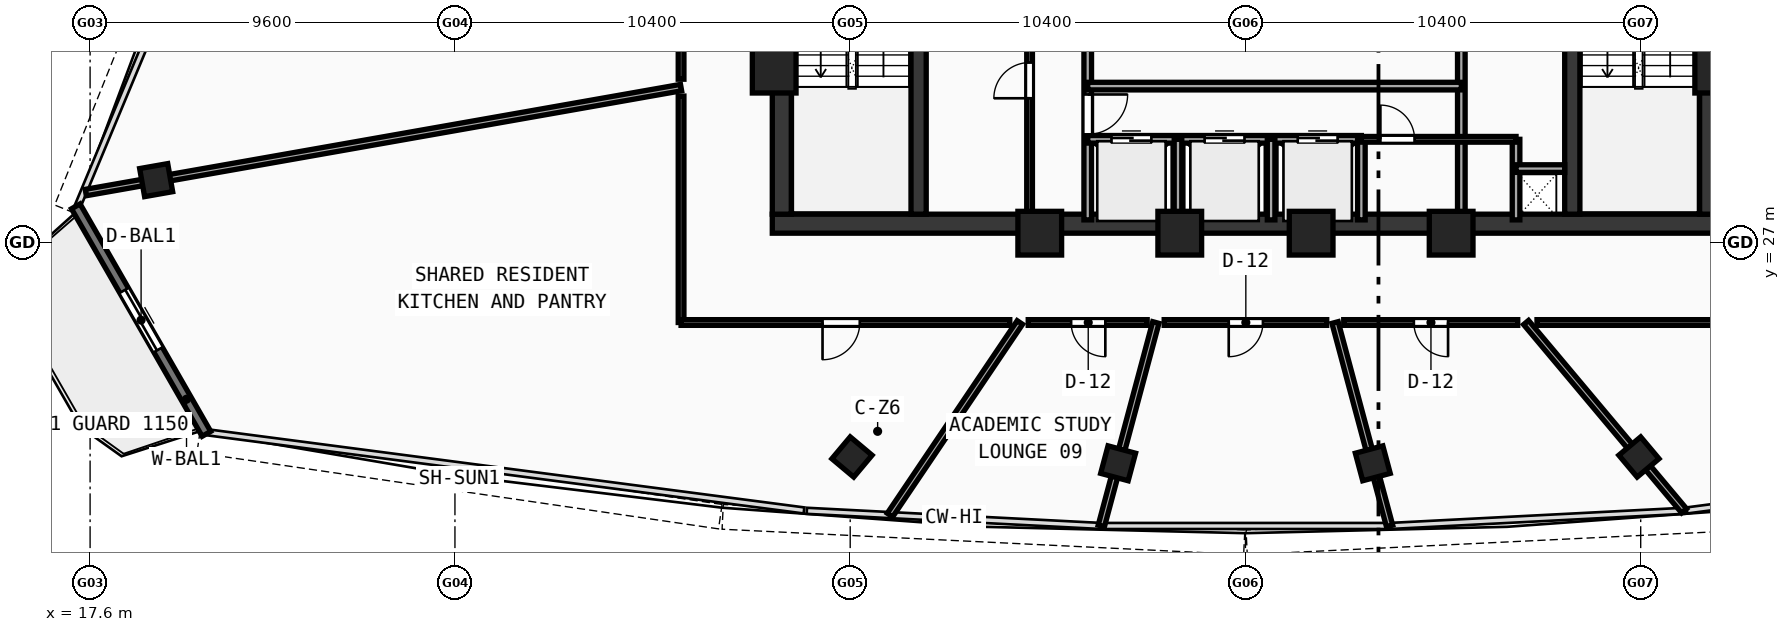
"""IFC4 building model, lengths in metres.
Left out: names, types, materials, properties, quantities, classifications, styles, units other than length and angle.
Written with IfcOpenShell. Run it as: python <this file> out.ifc"""

import sys

from ifc_helpers import new_model, si_unit, direction, frame, frame_2d, origin, origin_with_axes, origin_2d, place, context, subcontext, project, spatial, rectangle, hollow_rectangle, extrude, source, transform, mapped, element, fill, save


model = new_model("IFC4")
c1 = context("Model", 3, precision=1e-05, world=origin(), true_north=direction((0.0, 1.0)))
c2 = subcontext(c1, "Body", "Model", "MODEL_VIEW")
j1 = project(units=[si_unit("LENGTHUNIT", "METRE"), si_unit("PLANEANGLEUNIT", "RADIAN")], contexts=[c1])
p1 = place(None, origin())
s1 = spatial("IfcSite", under=j1, at=p1, CompositionType="ELEMENT")
p2 = place(p1, origin())
s2 = spatial("IfcBuilding", under=s1, at=p2, CompositionType="ELEMENT")
p3 = place(p2, frame((0.0, 0.0, 307.4)))
s3 = spatial("IfcBuildingStorey", under=s2, at=p3, CompositionType="ELEMENT", Elevation=307.4)
p4 = place(p3, frame((35.55, 27.5, 0.0), z_axis=(0.0, 0.0, 1.0), x_axis=(1.0, 0.0, 0.0)))
e1 = element("IfcWall", 1, at=p4, inside=s3, PredefinedType="SHEAR", context=c2, shape_type="SweptSolid", body=[
    extrude(rectangle(XDim=24.9, YDim=0.5, at=frame_2d((12.45, 0.0))), origin(), (0.0, 0.0, 1.0), 3.47),
])
for number, where, z_axis, x_axis in (
    (2, (35.8, 27.75, 0.0), (0.0, 0.0, 1.0), (0.0, 1.0, 0.0)),
    (3, (60.2, 27.75, 0.0), (0.0, 0.0, 1.0), (0.0, 1.0, 0.0)),
):
    element("IfcWall", number, at=place(p3, frame(where, z_axis=z_axis, x_axis=x_axis)), inside=s3, PredefinedType="SHEAR", context=c2, shape_type="SweptSolid", body=[
        extrude(rectangle(XDim=12.2, YDim=0.5, at=frame_2d((6.1, 0.0))), origin(), (0.0, 0.0, 1.0), 3.47),
    ])
p5 = place(p3, frame((39.4, 27.75, 0.0), z_axis=(0.0, 0.0, 1.0), x_axis=(0.0, 1.0, 0.0)))
e4 = element("IfcWall", 4, at=p5, inside=s3, PredefinedType="SHEAR", context=c2, shape_type="SweptSolid", body=[
    extrude(rectangle(XDim=12.2, YDim=0.4, at=frame_2d((6.1, 0.0))), origin(), (0.0, 0.0, 1.0), 3.47),
])
p6 = place(p5, frame((10.0, 0.0, 0.0)))
e5 = element("IfcOpeningElement", 5, at=p6, cuts=e4, PredefinedType="OPENING", context=c2, shape_type="SweptSolid", body=[
    extrude(rectangle(XDim=1.1, YDim=2.1, at=frame_2d((0.55, 1.05))), frame((0.0, 0.21, 0.0), z_axis=(0.0, -1.0, 0.0), x_axis=(1.0, 0.0, 0.0)), (0.0, 0.0, 1.0), 0.42),
])
p7 = place(p3, frame((56.6, 27.75, 0.0), z_axis=(0.0, 0.0, 1.0), x_axis=(0.0, 1.0, 0.0)))
e6 = element("IfcWall", 6, at=p7, inside=s3, PredefinedType="SHEAR", context=c2, shape_type="SweptSolid", body=[
    extrude(rectangle(XDim=12.2, YDim=0.4, at=frame_2d((6.1, 0.0))), origin(), (0.0, 0.0, 1.0), 3.47),
])
p8 = place(p7, frame((10.0, 0.0, 0.0)))
e7 = element("IfcOpeningElement", 7, at=p8, cuts=e6, PredefinedType="OPENING", context=c2, shape_type="SweptSolid", body=[
    extrude(rectangle(XDim=1.1, YDim=2.1, at=frame_2d((0.55, 1.05))), frame((0.0, 0.21, 0.0), z_axis=(0.0, -1.0, 0.0), x_axis=(1.0, 0.0, 0.0)), (0.0, 0.0, 1.0), 0.42),
])
m1 = source(origin(), c2, "Body", "SweptSolid", [
    extrude(hollow_rectangle(XDim=1.15, YDim=1.15, WallThickness=0.048, at=origin_2d()), origin(), (0.0, 0.0, 1.0), 3.73),
])
for number, where, z_axis, x_axis in (
    (8, (42.588, 27.25, -0.26), (0.0, 0.0, 1.0), (1.0, 0.0, 0.0)),
    (9, (46.272, 27.25, -0.26), (0.0, 0.0, 1.0), (1.0, 0.0, 0.0)),
    (10, (49.729, 27.25, -0.26), (0.0, 0.0, 1.0), (1.0, 0.0, 0.0)),
    (11, (53.412, 27.25, -0.26), (0.0, 0.0, 1.0), (1.0, 0.0, 0.0)),
    (12, (60.4, 31.513, -0.26), (0.0, 0.0, 1.0), (1.0, 0.0, 0.0)),
    (13, (35.6, 31.513, -0.26), (0.0, 0.0, 1.0), (1.0, 0.0, 0.0)),
):
    element("IfcColumn", number, at=place(p3, frame(where, z_axis=z_axis, x_axis=x_axis)), inside=s3, PredefinedType="COLUMN", context=c2, shape_type="MappedRepresentation", body=[
        mapped(m1, transform((0.0, 0.0, 0.0), scale=1.0)),
    ])
m2 = source(origin(), c2, "Body", "SweptSolid", [
    extrude(hollow_rectangle(XDim=0.75, YDim=0.75, WallThickness=0.028, at=origin_2d()), origin(), (0.0, 0.0, 1.0), 3.73),
])
for number, where, z_axis, x_axis in (
    (14, (37.647, 21.362, -0.26), (0.0, 0.0, 1.0), (0.766, -0.643, 0.0)),
    (15, (44.649, 21.196, -0.26), (0.0, 0.0, 1.0), (0.966, -0.259, 0.0)),
    (16, (51.351, 21.196, -0.26), (0.0, 0.0, 1.0), (0.966, 0.259, 0.0)),
    (17, (58.354, 21.362, -0.26), (0.0, 0.0, 1.0), (0.766, 0.643, 0.0)),
    (18, (19.338, 28.646, -0.26), (0.0, 0.0, 1.0), (0.174, -0.985, 0.0)),
):
    element("IfcColumn", number, at=place(p3, frame(where, z_axis=z_axis, x_axis=x_axis)), inside=s3, PredefinedType="COLUMN", context=c2, shape_type="MappedRepresentation", body=[
        mapped(m2, transform((0.0, 0.0, 0.0), scale=1.0)),
    ])
p9 = place(p3, frame((17.223, 27.957, 0.0), z_axis=(0.0, 0.0, 1.0), x_axis=(0.49793943781, -0.867211805889, 0.0)))
e19 = element("IfcWall", 19, at=p9, inside=s3, PredefinedType="STANDARD", context=c2, shape_type="SweptSolid", body=[
    extrude(rectangle(XDim=6.903, YDim=0.26, at=frame_2d((3.452, 0.0))), origin(), (0.0, 0.0, 1.0), 3.47),
])
p10 = place(p9, frame((2.552, 0.0, 0.0)))
e20 = element("IfcOpeningElement", 20, at=p10, cuts=e19, PredefinedType="OPENING", context=c2, shape_type="SweptSolid", body=[
    extrude(rectangle(XDim=1.8, YDim=2.15, at=frame_2d((0.9, 1.075))), frame((0.0, 0.14, 0.0), z_axis=(0.0, -1.0, 0.0), x_axis=(1.0, 0.0, 0.0)), (0.0, 0.0, 1.0), 0.28),
])
p11 = place(p3, frame((43.85, 27.6, 0.0), z_axis=(0.0, 0.0, 1.0), x_axis=(0.0, 1.0, 0.0)))
e21 = element("IfcWall", 21, at=p11, inside=s3, PredefinedType="SOLIDWALL", context=c2, shape_type="SweptSolid", body=[
    extrude(rectangle(XDim=6.22, YDim=0.2, at=frame_2d((3.11, 0.0))), origin(), (0.0, 0.0, 1.0), 3.47),
])
p12 = place(p11, frame((2.25, 0.0, 0.0)))
e22 = element("IfcOpeningElement", 22, at=p12, cuts=e21, PredefinedType="OPENING", context=c2, shape_type="SweptSolid", body=[
    extrude(rectangle(XDim=1.05, YDim=2.1, at=frame_2d((0.525, 1.05))), frame((0.0, 0.11, 0.0), z_axis=(0.0, -1.0, 0.0), x_axis=(1.0, 0.0, 0.0)), (0.0, 0.0, 1.0), 0.22),
])
p13 = place(p3, frame((53.68, 27.6, 0.0), z_axis=(0.0, 0.0, 1.0), x_axis=(0.0, 1.0, 0.0)))
e23 = element("IfcWall", 23, at=p13, inside=s3, PredefinedType="SOLIDWALL", context=c2, shape_type="SweptSolid", body=[
    extrude(rectangle(XDim=9.05, YDim=0.2, at=frame_2d((4.525, 0.0))), origin(), (0.0, 0.0, 1.0), 3.47),
])
p14 = place(p13, frame((6.9, 0.0, 0.0)))
e24 = element("IfcOpeningElement", 24, at=p14, cuts=e23, PredefinedType="OPENING", context=c2, shape_type="SweptSolid", body=[
    extrude(rectangle(XDim=1.05, YDim=2.1, at=frame_2d((0.525, 1.05))), frame((0.0, 0.11, 0.0), z_axis=(0.0, -1.0, 0.0), x_axis=(1.0, 0.0, 0.0)), (0.0, 0.0, 1.0), 0.22),
])
p15 = place(p3, frame((43.85, 29.72, 0.0), z_axis=(0.0, 0.0, 1.0), x_axis=(1.0, 0.0, 0.0)))
e25 = element("IfcWall", 25, at=p15, inside=s3, PredefinedType="SOLIDWALL", context=c2, shape_type="SweptSolid", body=[
    extrude(rectangle(XDim=7.2, YDim=0.2, at=frame_2d((3.6, 0.0))), origin(), (0.0, 0.0, 1.0), 3.47),
])
p16 = place(p15, frame((0.625, 0.0, 0.0)))
e26 = element("IfcOpeningElement", 26, at=p16, cuts=e25, PredefinedType="OPENING", context=c2, shape_type="SweptSolid", body=[
    extrude(rectangle(XDim=1.05, YDim=2.1, at=frame_2d((0.525, 1.05))), frame((0.0, 0.11, 0.0), z_axis=(0.0, -1.0, 0.0), x_axis=(1.0, 0.0, 0.0)), (0.0, 0.0, 1.0), 0.22),
])
p17 = place(p15, frame((3.075, 0.0, 0.0)))
e27 = element("IfcOpeningElement", 27, at=p17, cuts=e25, PredefinedType="OPENING", context=c2, shape_type="SweptSolid", body=[
    extrude(rectangle(XDim=1.05, YDim=2.1, at=frame_2d((0.525, 1.05))), frame((0.0, 0.11, 0.0), z_axis=(0.0, -1.0, 0.0), x_axis=(1.0, 0.0, 0.0)), (0.0, 0.0, 1.0), 0.22),
])
p18 = place(p15, frame((5.525, 0.0, 0.0)))
e28 = element("IfcOpeningElement", 28, at=p18, cuts=e25, PredefinedType="OPENING", context=c2, shape_type="SweptSolid", body=[
    extrude(rectangle(XDim=1.05, YDim=2.1, at=frame_2d((0.525, 1.05))), frame((0.0, 0.11, 0.0), z_axis=(0.0, -1.0, 0.0), x_axis=(1.0, 0.0, 0.0)), (0.0, 0.0, 1.0), 0.22),
])
p19 = place(p3, frame((51.05, 27.6, 0.0), z_axis=(0.0, 0.0, 1.0), x_axis=(0.0, 1.0, 0.0)))
e29 = element("IfcWall", 29, at=p19, inside=s3, PredefinedType="SOLIDWALL", context=c2, shape_type="SweptSolid", body=[
    extrude(rectangle(XDim=2.12, YDim=0.2, at=frame_2d((1.06, 0.0))), origin(), (0.0, 0.0, 1.0), 3.47),
])
p20 = place(p3, frame((43.85, 31.12, 0.0), z_axis=(0.0, 0.0, 1.0), x_axis=(1.0, 0.0, 0.0)))
e30 = element("IfcWall", 30, at=p20, inside=s3, PredefinedType="SOLIDWALL", context=c2, shape_type="SweptSolid", body=[
    extrude(rectangle(XDim=9.83, YDim=0.2, at=frame_2d((4.915, 0.0))), origin(), (0.0, 0.0, 1.0), 3.47),
])
for number, where, z_axis, x_axis in (
    (31, (46.225, 27.6, 0.0), (0.0, 0.0, 1.0), (0.0, 1.0, 0.0)),
    (32, (48.675, 27.6, 0.0), (0.0, 0.0, 1.0), (0.0, 1.0, 0.0)),
    (33, (55.12, 27.6, 0.0), (0.0, 0.0, 1.0), (0.0, 1.0, 0.0)),
):
    element("IfcWall", number, at=place(p3, frame(where, z_axis=z_axis, x_axis=x_axis)), inside=s3, PredefinedType="SOLIDWALL", context=c2, shape_type="SweptSolid", body=[
        extrude(rectangle(XDim=2.12, YDim=0.2, at=frame_2d((1.06, 0.0))), origin(), (0.0, 0.0, 1.0), 3.47),
    ])
p21 = place(p3, frame((55.12, 28.95, 0.0), z_axis=(0.0, 0.0, 1.0), x_axis=(1.0, 0.0, 0.0)))
e34 = element("IfcWall", 34, at=p21, inside=s3, PredefinedType="SOLIDWALL", context=c2, shape_type="SweptSolid", body=[
    extrude(rectangle(XDim=1.28, YDim=0.2, at=frame_2d((0.64, 0.0))), origin(), (0.0, 0.0, 1.0), 3.47),
])
p22 = place(p3, frame((42.32, 27.6, 0.0), z_axis=(0.0, 0.0, 1.0), x_axis=(0.0, 1.0, 0.0)))
e35 = element("IfcWall", 35, at=p22, inside=s3, PredefinedType="PARTITIONING", context=c2, shape_type="SweptSolid", body=[
    extrude(rectangle(XDim=5.9, YDim=0.15, at=frame_2d((2.95, 0.0))), origin(), (0.0, 0.0, 1.0), 3.47),
])
p23 = place(p22, frame((3.2, 0.0, 0.0)))
e36 = element("IfcOpeningElement", 36, at=p23, cuts=e35, PredefinedType="OPENING", context=c2, shape_type="SweptSolid", body=[
    extrude(rectangle(XDim=0.94, YDim=2.1, at=frame_2d((0.47, 1.05))), frame((0.0, 0.085, 0.0), z_axis=(0.0, -1.0, 0.0), x_axis=(1.0, 0.0, 0.0)), (0.0, 0.0, 1.0), 0.17),
])
p24 = place(p3, frame((51.05, 29.72, 0.0), z_axis=(0.0, 0.0, 1.0), x_axis=(1.0, 0.0, 0.0)))
e37 = element("IfcWall", 37, at=p24, inside=s3, PredefinedType="PARTITIONING", context=c2, shape_type="SweptSolid", body=[
    extrude(rectangle(XDim=4.07, YDim=0.15, at=frame_2d((2.035, 0.0))), origin(), (0.0, 0.0, 1.0), 3.47),
])
p25 = place(p24, frame((0.5, 0.0, 0.0)))
e38 = element("IfcOpeningElement", 38, at=p25, cuts=e37, PredefinedType="OPENING", context=c2, shape_type="SweptSolid", body=[
    extrude(rectangle(XDim=0.9, YDim=2.1, at=frame_2d((0.45, 1.05))), frame((0.0, 0.085, 0.0), z_axis=(0.0, -1.0, 0.0), x_axis=(1.0, 0.0, 0.0)), (0.0, 0.0, 1.0), 0.17),
])
p26 = place(p3, frame((33.15, 31.082, 0.0), z_axis=(0.0, 0.0, 1.0), x_axis=(-0.984807655248, -0.173648732116, 0.0)))
e39 = element("IfcWall", 39, at=p26, inside=s3, PredefinedType="PARTITIONING", context=c2, shape_type="SweptSolid", body=[
    extrude(rectangle(XDim=15.906, YDim=0.17, at=frame_2d((7.953, 0.0))), origin(), (0.0, 0.0, 1.0), 2.87),
])
p27 = place(p3, frame((42.064, 24.9, 0.0), z_axis=(0.0, 0.0, 1.0), x_axis=(-0.559190191843, -0.829039401564, 0.0)))
e40 = element("IfcWall", 40, at=p27, inside=s3, PredefinedType="PARTITIONING", context=c2, shape_type="SweptSolid", body=[
    extrude(rectangle(XDim=6.112, YDim=0.17, at=frame_2d((3.056, 0.0))), origin(), (0.0, 0.0, 1.0), 2.87),
])
for number, where, z_axis, x_axis in (
    (41, (45.642, 24.9, 0.0), (0.0, 0.0, 1.0), (-0.259, -0.966, 0.0)),
    (42, (50.358, 24.9, 0.0), (0.0, 0.0, 1.0), (0.259, -0.966, 0.0)),
):
    element("IfcWall", number, at=place(p3, frame(where, z_axis=z_axis, x_axis=x_axis)), inside=s3, PredefinedType="PARTITIONING", context=c2, shape_type="SweptSolid", body=[
        extrude(rectangle(XDim=5.543, YDim=0.17, at=frame_2d((2.771, 0.0))), origin(), (0.0, 0.0, 1.0), 2.87),
    ])
p28 = place(p3, frame((55.384, 24.9, 0.0), z_axis=(0.0, 0.0, 1.0), x_axis=(0.642794522615, -0.76603864243, 0.0)))
e43 = element("IfcWall", 43, at=p28, inside=s3, PredefinedType="PARTITIONING", context=c2, shape_type="SweptSolid", body=[
    extrude(rectangle(XDim=6.468, YDim=0.17, at=frame_2d((3.234, 0.0))), origin(), (0.0, 0.0, 1.0), 2.87),
])
p29 = place(p3, frame((33.15, 24.9, 0.0), z_axis=(0.0, 0.0, 1.0), x_axis=(0.0, 1.0, 0.0)))
e44 = element("IfcWall", 44, at=p29, inside=s3, PredefinedType="PARTITIONING", context=c2, shape_type="SweptSolid", body=[
    extrude(rectangle(XDim=5.958, YDim=0.15, at=frame_2d((2.979, 0.0))), origin(), (0.0, 0.0, 1.0), 3.12),
])
p30 = place(p3, frame((33.15, 31.301, 0.0), z_axis=(0.0, 0.0, 1.0), x_axis=(0.0, 1.0, 0.0)))
e45 = element("IfcWall", 45, at=p30, inside=s3, PredefinedType="PARTITIONING", context=c2, shape_type="SweptSolid", body=[
    extrude(rectangle(XDim=7.004, YDim=0.15, at=frame_2d((3.502, 0.0))), origin(), (0.0, 0.0, 1.0), 3.47),
])
p31 = place(p30, frame((3.027, 0.0, 0.0)))
e46 = element("IfcOpeningElement", 46, at=p31, cuts=e45, PredefinedType="OPENING", context=c2, shape_type="SweptSolid", body=[
    extrude(rectangle(XDim=0.98, YDim=2.12, at=frame_2d((0.49, 1.06))), frame((0.0, 0.085, 0.0), z_axis=(0.0, -1.0, 0.0), x_axis=(1.0, 0.0, 0.0)), (0.0, 0.0, 1.0), 0.17),
])
p32 = place(p3, frame((62.85, 24.9, 0.0), z_axis=(0.0, 0.0, 1.0), x_axis=(-1.0, 0.0, 0.0)))
e47 = element("IfcWall", 47, at=p32, inside=s3, PredefinedType="PARTITIONING", context=c2, shape_type="SweptSolid", body=[
    extrude(rectangle(XDim=7.179, YDim=0.15, at=frame_2d((3.589, 0.0))), origin(), (0.0, 0.0, 1.0), 3.12),
])
p33 = place(p3, frame((55.164, 24.9, 0.0), z_axis=(0.0, 0.0, 1.0), x_axis=(-1.0, 0.0, 0.0)))
e48 = element("IfcWall", 48, at=p33, inside=s3, PredefinedType="PARTITIONING", context=c2, shape_type="SweptSolid", body=[
    extrude(rectangle(XDim=4.579, YDim=0.15, at=frame_2d((2.289, 0.0))), origin(), (0.0, 0.0, 1.0), 3.47),
])
p34 = place(p33, frame((1.833, 0.0, 0.0)))
e49 = element("IfcOpeningElement", 49, at=p34, cuts=e48, PredefinedType="OPENING", context=c2, shape_type="SweptSolid", body=[
    extrude(rectangle(XDim=0.9, YDim=2.08, at=frame_2d((0.45, 1.04))), frame((0.0, 0.085, 0.0), z_axis=(0.0, -1.0, 0.0), x_axis=(1.0, 0.0, 0.0)), (0.0, 0.0, 1.0), 0.17),
])
p35 = place(p3, frame((50.138, 24.9, 0.0), z_axis=(0.0, 0.0, 1.0), x_axis=(-1.0, 0.0, 0.0)))
e50 = element("IfcWall", 50, at=p35, inside=s3, PredefinedType="PARTITIONING", context=c2, shape_type="SweptSolid", body=[
    extrude(rectangle(XDim=4.276, YDim=0.15, at=frame_2d((2.138, 0.0))), origin(), (0.0, 0.0, 1.0), 3.12),
])
p36 = place(p35, frame((1.678, 0.0, 0.0)))
e51 = element("IfcOpeningElement", 51, at=p36, cuts=e50, PredefinedType="OPENING", context=c2, shape_type="SweptSolid", body=[
    extrude(rectangle(XDim=0.9, YDim=2.08, at=frame_2d((0.45, 1.04))), frame((0.0, 0.085, 0.0), z_axis=(0.0, -1.0, 0.0), x_axis=(1.0, 0.0, 0.0)), (0.0, 0.0, 1.0), 0.17),
])
p37 = place(p3, frame((45.414, 24.9, 0.0), z_axis=(0.0, 0.0, 1.0), x_axis=(-1.0, 0.0, 0.0)))
e52 = element("IfcWall", 52, at=p37, inside=s3, PredefinedType="PARTITIONING", context=c2, shape_type="SweptSolid", body=[
    extrude(rectangle(XDim=3.13, YDim=0.15, at=frame_2d((1.565, 0.0))), origin(), (0.0, 0.0, 1.0), 3.47),
])
p38 = place(p37, frame((1.101, 0.0, 0.0)))
e53 = element("IfcOpeningElement", 53, at=p38, cuts=e52, PredefinedType="OPENING", context=c2, shape_type="SweptSolid", body=[
    extrude(rectangle(XDim=0.9, YDim=2.08, at=frame_2d((0.45, 1.04))), frame((0.0, 0.085, 0.0), z_axis=(0.0, -1.0, 0.0), x_axis=(1.0, 0.0, 0.0)), (0.0, 0.0, 1.0), 0.17),
])
p39 = place(p3, frame((41.799, 24.9, 0.0), z_axis=(0.0, 0.0, 1.0), x_axis=(-1.0, 0.0, 0.0)))
e54 = element("IfcWall", 54, at=p39, inside=s3, PredefinedType="PARTITIONING", context=c2, shape_type="SweptSolid", body=[
    extrude(rectangle(XDim=8.649, YDim=0.15, at=frame_2d((4.324, 0.0))), origin(), (0.0, 0.0, 1.0), 2.87),
])
p40 = place(p39, frame((3.947, 0.0, 0.0)))
e55 = element("IfcOpeningElement", 55, at=p40, cuts=e54, PredefinedType="OPENING", context=c2, shape_type="SweptSolid", body=[
    extrude(rectangle(XDim=0.98, YDim=2.12, at=frame_2d((0.49, 1.06))), frame((0.0, 0.085, 0.0), z_axis=(0.0, -1.0, 0.0), x_axis=(1.0, 0.0, 0.0)), (0.0, 0.0, 1.0), 0.17),
])
m3 = source(origin(), c2, "Body", "SweptSolid", [
    extrude(rectangle(XDim=1.8, YDim=2.15, at=frame_2d((0.9, 1.075))), frame((0.0, 0.025, 0.0), z_axis=(0.0, -1.0, 0.0), x_axis=(1.0, 0.0, 0.0)), (0.0, 0.0, 1.0), 0.05),
])
p41 = place(p10, origin_with_axes())
e56 = element("IfcDoor", 56, at=p41, inside=s3, OperationType="DOUBLE_DOOR_SLIDING", PredefinedType="DOOR", context=c2, shape_type="MappedRepresentation", body=[
    mapped(m3, transform((0.0, 0.0, 0.0), scale=1.0)),
])
fill(e20, e56)
m4 = source(origin(), c2, "Body", "SweptSolid", [
    extrude(rectangle(XDim=1.05, YDim=2.1, at=frame_2d((0.525, 1.05))), frame((0.0, 0.025, 0.0), z_axis=(0.0, -1.0, 0.0), x_axis=(1.0, 0.0, 0.0)), (0.0, 0.0, 1.0), 0.05),
])
p42 = place(p12, frame((1.05, 0.0, 0.0), z_axis=(0.0, 0.0, 1.0), x_axis=(-1.0, 0.0, 0.0)))
e57 = element("IfcDoor", 57, at=p42, inside=s3, OperationType="SINGLE_SWING_LEFT", PredefinedType="DOOR", context=c2, shape_type="MappedRepresentation", body=[
    mapped(m4, transform((0.0, 0.0, 0.0), scale=1.0)),
])
fill(e22, e57)
p43 = place(p16, origin_with_axes())
e58 = element("IfcDoor", 58, at=p43, inside=s3, OperationType="DOUBLE_DOOR_SLIDING", PredefinedType="DOOR", context=c2, shape_type="MappedRepresentation", body=[
    mapped(m4, transform((0.0, 0.0, 0.0), scale=1.0)),
])
fill(e26, e58)
p44 = place(p17, origin_with_axes())
e59 = element("IfcDoor", 59, at=p44, inside=s3, OperationType="DOUBLE_DOOR_SLIDING", PredefinedType="DOOR", context=c2, shape_type="MappedRepresentation", body=[
    mapped(m4, transform((0.0, 0.0, 0.0), scale=1.0)),
])
fill(e27, e59)
p45 = place(p18, origin_with_axes())
e60 = element("IfcDoor", 60, at=p45, inside=s3, OperationType="DOUBLE_DOOR_SLIDING", PredefinedType="DOOR", context=c2, shape_type="MappedRepresentation", body=[
    mapped(m4, transform((0.0, 0.0, 0.0), scale=1.0)),
])
fill(e28, e60)
m5 = source(origin(), c2, "Body", "SweptSolid", [
    extrude(rectangle(XDim=0.94, YDim=2.1, at=frame_2d((0.47, 1.05))), frame((0.0, 0.025, 0.0), z_axis=(0.0, -1.0, 0.0), x_axis=(1.0, 0.0, 0.0)), (0.0, 0.0, 1.0), 0.05),
])
p46 = place(p23, origin_with_axes())
e61 = element("IfcDoor", 61, at=p46, inside=s3, OperationType="SINGLE_SWING_LEFT", PredefinedType="DOOR", context=c2, shape_type="MappedRepresentation", body=[
    mapped(m5, transform((0.0, 0.0, 0.0), scale=1.0)),
])
fill(e36, e61)
m6 = source(origin(), c2, "Body", "SweptSolid", [
    extrude(rectangle(XDim=0.9, YDim=2.1, at=frame_2d((0.45, 1.05))), frame((0.0, 0.025, 0.0), z_axis=(0.0, -1.0, 0.0), x_axis=(1.0, 0.0, 0.0)), (0.0, 0.0, 1.0), 0.05),
])
p47 = place(p25, origin_with_axes())
e62 = element("IfcDoor", 62, at=p47, inside=s3, OperationType="SINGLE_SWING_LEFT", PredefinedType="DOOR", context=c2, shape_type="MappedRepresentation", body=[
    mapped(m6, transform((0.0, 0.0, 0.0), scale=1.0)),
])
fill(e38, e62)
m7 = source(origin(), c2, "Body", "SweptSolid", [
    extrude(rectangle(XDim=0.98, YDim=2.12, at=frame_2d((0.49, 1.06))), frame((0.0, 0.025, 0.0), z_axis=(0.0, -1.0, 0.0), x_axis=(1.0, 0.0, 0.0)), (0.0, 0.0, 1.0), 0.05),
])
p48 = place(p40, origin_with_axes())
e63 = element("IfcDoor", 63, at=p48, inside=s3, OperationType="SINGLE_SWING_RIGHT", PredefinedType="DOOR", context=c2, shape_type="MappedRepresentation", body=[
    mapped(m7, transform((0.0, 0.0, 0.0), scale=1.0)),
])
fill(e55, e63)
m8 = source(origin(), c2, "Body", "SweptSolid", [
    extrude(rectangle(XDim=0.9, YDim=2.08, at=frame_2d((0.45, 1.04))), frame((0.0, 0.025, 0.0), z_axis=(0.0, -1.0, 0.0), x_axis=(1.0, 0.0, 0.0)), (0.0, 0.0, 1.0), 0.05),
])
p49 = place(p38, origin_with_axes())
e64 = element("IfcDoor", 64, at=p49, inside=s3, OperationType="SINGLE_SWING_LEFT", PredefinedType="DOOR", context=c2, shape_type="MappedRepresentation", body=[
    mapped(m8, transform((0.0, 0.0, 0.0), scale=1.0)),
])
fill(e53, e64)
p50 = place(p36, origin_with_axes())
e65 = element("IfcDoor", 65, at=p50, inside=s3, OperationType="SINGLE_SWING_RIGHT", PredefinedType="DOOR", context=c2, shape_type="MappedRepresentation", body=[
    mapped(m8, transform((0.0, 0.0, 0.0), scale=1.0)),
])
fill(e51, e65)
p51 = place(p34, origin_with_axes())
e66 = element("IfcDoor", 66, at=p51, inside=s3, OperationType="SINGLE_SWING_LEFT", PredefinedType="DOOR", context=c2, shape_type="MappedRepresentation", body=[
    mapped(m8, transform((0.0, 0.0, 0.0), scale=1.0)),
])
fill(e49, e66)
save(model, sys.argv[1])
